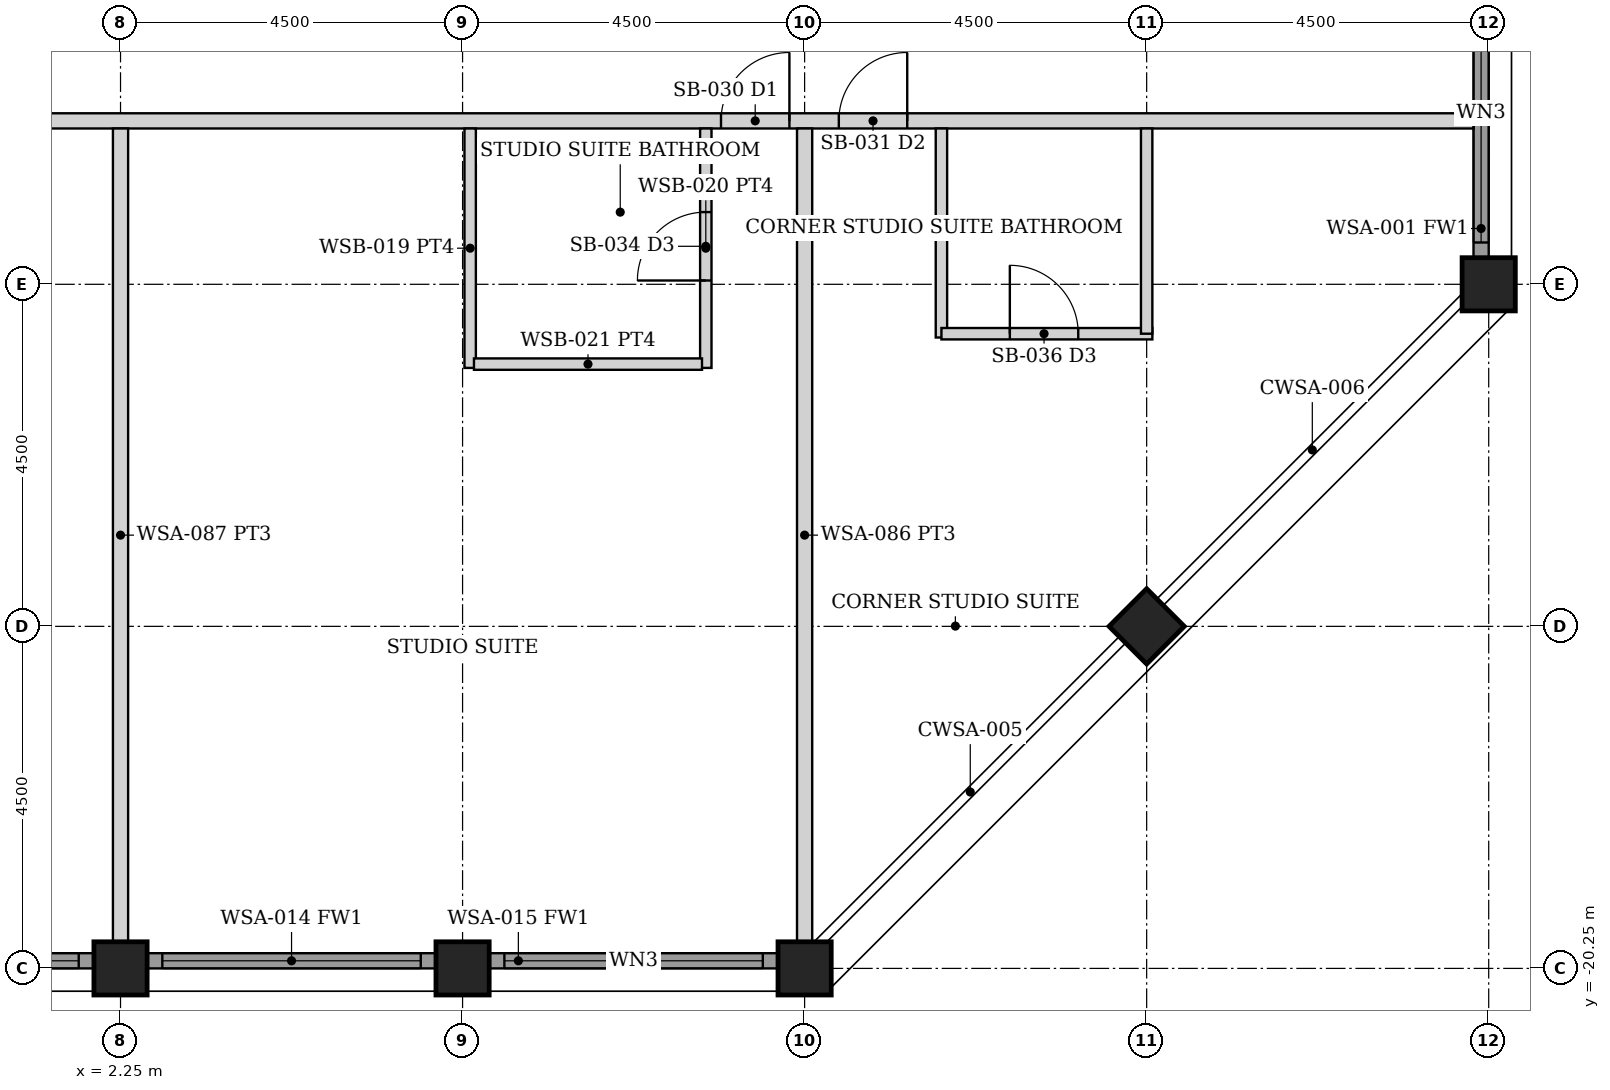
"""IFC4 building model, lengths in metres.
Left out: names, types, materials, properties, quantities, classifications, styles, units other than length and angle.
Written with IfcOpenShell. Run it as: python <this file> out.ifc"""

import sys

from ifc_helpers import new_model, si_unit, direction, frame, frame_2d, origin, origin_2d, place, context, subcontext, project, spatial, rectangle, hollow_rectangle, extrude, element, fill, save


model = new_model("IFC4")
c1 = context("Model", 3, precision=1e-05, world=origin(), true_north=direction((0.0, 1.0)))
c2 = subcontext(c1, "Body", "Model", "MODEL_VIEW")
j1 = project(units=[si_unit("LENGTHUNIT", "METRE"), si_unit("PLANEANGLEUNIT", "RADIAN")], contexts=[c1])
p1 = place(None, origin())
s1 = spatial("IfcSite", under=j1, at=p1, CompositionType="ELEMENT")
p2 = place(p1, origin())
s2 = spatial("IfcBuilding", under=s1, at=p2, CompositionType="ELEMENT")
p3 = place(p2, frame((0.0, 0.0, 212.05)))
s3 = spatial("IfcBuildingStorey", under=s2, at=p3, CompositionType="ELEMENT", Elevation=212.05)
for number, where, z_axis, x_axis in (
    (1, (20.25, -11.25, 0.0), (0.0, 0.0, 1.0), (1.0, 0.0, 0.0)),
    (2, (2.25, -20.25, 0.0), (0.0, 0.0, 1.0), (0.0, 1.0, 0.0)),
    (3, (6.75, -20.25, 0.0), (0.0, 0.0, 1.0), (0.0, 1.0, 0.0)),
    (4, (11.25, -20.25, 0.0), (0.0, 0.0, 1.0), (0.0, 1.0, 0.0)),
    (5, (15.75, -15.75, 0.0), (0.0, 0.0, 1.0), (0.707, -0.707, 0.0)),
):
    element("IfcColumn", number, at=place(p3, frame(where, z_axis=z_axis, x_axis=x_axis)), inside=s3, PredefinedType="COLUMN", context=c2, shape_type="SweptSolid", body=[
        extrude(hollow_rectangle(XDim=0.7, YDim=0.7, WallThickness=0.045, at=origin_2d()), origin(), (0.0, 0.0, 1.0), 3.75),
    ])
p4 = place(p3, frame((-1.895, -20.15, 0.0), z_axis=(0.0, 0.0, 1.0), x_axis=(1.0, 0.0, 0.0)))
e6 = element("IfcWall", 6, at=p4, inside=s3, PredefinedType="SOLIDWALL", context=c2, shape_type="SweptSolid", body=[
    extrude(rectangle(XDim=3.79, YDim=0.2, at=frame_2d((1.895, 0.0))), origin(), (0.0, 0.0, 1.0), 2.629),
])
p5 = place(p4, frame((0.195, 0.0, 0.3)))
e7 = element("IfcOpeningElement", 7, at=p5, cuts=e6, PredefinedType="OPENING", context=c2, shape_type="SweptSolid", body=[
    extrude(rectangle(XDim=3.4, YDim=2.179, at=frame_2d((1.7, 1.089))), frame((0.0, 0.11, 0.0), z_axis=(0.0, -1.0, 0.0), x_axis=(1.0, 0.0, 0.0)), (0.0, 0.0, 1.0), 0.22),
])
p6 = place(p3, frame((2.605, -20.15, 0.0), z_axis=(0.0, 0.0, 1.0), x_axis=(1.0, 0.0, 0.0)))
e8 = element("IfcWall", 8, at=p6, inside=s3, PredefinedType="SOLIDWALL", context=c2, shape_type="SweptSolid", body=[
    extrude(rectangle(XDim=3.79, YDim=0.2, at=frame_2d((1.895, 0.0))), origin(), (0.0, 0.0, 1.0), 2.629),
])
p7 = place(p6, frame((0.195, 0.0, 0.3)))
e9 = element("IfcOpeningElement", 9, at=p7, cuts=e8, PredefinedType="OPENING", context=c2, shape_type="SweptSolid", body=[
    extrude(rectangle(XDim=3.4, YDim=2.179, at=frame_2d((1.7, 1.089))), frame((0.0, 0.11, 0.0), z_axis=(0.0, -1.0, 0.0), x_axis=(1.0, 0.0, 0.0)), (0.0, 0.0, 1.0), 0.22),
])
p8 = place(p3, frame((7.105, -20.15, 0.0), z_axis=(0.0, 0.0, 1.0), x_axis=(1.0, 0.0, 0.0)))
e10 = element("IfcWall", 10, at=p8, inside=s3, PredefinedType="SOLIDWALL", context=c2, shape_type="SweptSolid", body=[
    extrude(rectangle(XDim=3.79, YDim=0.2, at=frame_2d((1.895, 0.0))), origin(), (0.0, 0.0, 1.0), 2.629),
])
p9 = place(p8, frame((0.195, 0.0, 0.3)))
e11 = element("IfcOpeningElement", 11, at=p9, cuts=e10, PredefinedType="OPENING", context=c2, shape_type="SweptSolid", body=[
    extrude(rectangle(XDim=3.4, YDim=2.179, at=frame_2d((1.7, 1.089))), frame((0.0, 0.11, 0.0), z_axis=(0.0, -1.0, 0.0), x_axis=(1.0, 0.0, 0.0)), (0.0, 0.0, 1.0), 0.22),
])
p10 = place(p3, frame((20.15, -10.895, 0.0), z_axis=(0.0, 0.0, 1.0), x_axis=(0.0, 1.0, 0.0)))
e12 = element("IfcWall", 12, at=p10, inside=s3, PredefinedType="SOLIDWALL", context=c2, shape_type="SweptSolid", body=[
    extrude(rectangle(XDim=3.79, YDim=0.2, at=frame_2d((1.895, 0.0))), origin(), (0.0, 0.0, 1.0), 2.629),
])
p11 = place(p10, frame((0.195, 0.0, 0.3)))
e13 = element("IfcOpeningElement", 13, at=p11, cuts=e12, PredefinedType="OPENING", context=c2, shape_type="SweptSolid", body=[
    extrude(rectangle(XDim=3.4, YDim=2.179, at=frame_2d((1.7, 1.089))), frame((0.0, 0.11, 0.0), z_axis=(0.0, -1.0, 0.0), x_axis=(1.0, 0.0, 0.0)), (0.0, 0.0, 1.0), 0.22),
])
p12 = place(p3, frame((-20.05, -9.1, 0.0), z_axis=(0.0, 0.0, 1.0), x_axis=(1.0, 0.0, 0.0)))
e14 = element("IfcWall", 14, at=p12, inside=s3, PredefinedType="PARTITIONING", context=c2, shape_type="SweptSolid", body=[
    extrude(rectangle(XDim=40.1, YDim=0.2, at=frame_2d((20.05, 0.0))), origin(), (0.0, 0.0, 1.0), 2.629),
])
p13 = place(p12, frame((9.0, 0.0, 0.0)))
e15 = element("IfcOpeningElement", 15, at=p13, cuts=e14, PredefinedType="OPENING", context=c2, shape_type="SweptSolid", body=[
    extrude(rectangle(XDim=0.9, YDim=2.1, at=frame_2d((0.45, 1.05))), frame((0.0, 0.11, 0.0), z_axis=(0.0, -1.0, 0.0), x_axis=(1.0, 0.0, 0.0)), (0.0, 0.0, 1.0), 0.22),
])
p14 = place(p12, frame((13.5, 0.0, 0.0)))
e16 = element("IfcOpeningElement", 16, at=p14, cuts=e14, PredefinedType="OPENING", context=c2, shape_type="SweptSolid", body=[
    extrude(rectangle(XDim=0.9, YDim=2.1, at=frame_2d((0.45, 1.05))), frame((0.0, 0.11, 0.0), z_axis=(0.0, -1.0, 0.0), x_axis=(1.0, 0.0, 0.0)), (0.0, 0.0, 1.0), 0.22),
])
p15 = place(p12, frame((30.2, 0.0, 0.0)))
e17 = element("IfcOpeningElement", 17, at=p15, cuts=e14, PredefinedType="OPENING", context=c2, shape_type="SweptSolid", body=[
    extrude(rectangle(XDim=0.9, YDim=2.1, at=frame_2d((0.45, 1.05))), frame((0.0, 0.11, 0.0), z_axis=(0.0, -1.0, 0.0), x_axis=(1.0, 0.0, 0.0)), (0.0, 0.0, 1.0), 0.22),
])
p16 = place(p12, frame((31.75, 0.0, 0.0)))
e18 = element("IfcOpeningElement", 18, at=p16, cuts=e14, PredefinedType="OPENING", context=c2, shape_type="SweptSolid", body=[
    extrude(rectangle(XDim=0.9, YDim=2.1, at=frame_2d((0.45, 1.05))), frame((0.0, 0.11, 0.0), z_axis=(0.0, -1.0, 0.0), x_axis=(1.0, 0.0, 0.0)), (0.0, 0.0, 1.0), 0.22),
])
p17 = place(p12, frame((7.45, 0.0, 0.0)))
e19 = element("IfcOpeningElement", 19, at=p17, cuts=e14, PredefinedType="OPENING", context=c2, shape_type="SweptSolid", body=[
    extrude(rectangle(XDim=0.9, YDim=2.1, at=frame_2d((0.45, 1.05))), frame((0.0, 0.11, 0.0), z_axis=(0.0, -1.0, 0.0), x_axis=(1.0, 0.0, 0.0)), (0.0, 0.0, 1.0), 0.22),
])
p18 = place(p3, frame((9.95, -12.35, 0.0), z_axis=(0.0, 0.0, 1.0), x_axis=(0.0, 1.0, 0.0)))
e20 = element("IfcWall", 20, at=p18, inside=s3, PredefinedType="PARTITIONING", context=c2, shape_type="SweptSolid", body=[
    extrude(rectangle(XDim=3.15, YDim=0.15, at=frame_2d((1.575, 0.0))), origin(), (0.0, 0.0, 1.0), 2.629),
])
p19 = place(p18, frame((1.15, 0.0, 0.0)))
e21 = element("IfcOpeningElement", 21, at=p19, cuts=e20, PredefinedType="OPENING", context=c2, shape_type="SweptSolid", body=[
    extrude(rectangle(XDim=0.9, YDim=2.1, at=frame_2d((0.45, 1.05))), frame((0.0, 0.085, 0.0), z_axis=(0.0, -1.0, 0.0), x_axis=(1.0, 0.0, 0.0)), (0.0, 0.0, 1.0), 0.17),
])
p20 = place(p3, frame((6.85, -12.35, 0.0), z_axis=(0.0, 0.0, 1.0), x_axis=(0.0, 1.0, 0.0)))
e22 = element("IfcWall", 22, at=p20, inside=s3, PredefinedType="PARTITIONING", context=c2, shape_type="SweptSolid", body=[
    extrude(rectangle(XDim=3.15, YDim=0.15, at=frame_2d((1.575, 0.0))), origin(), (0.0, 0.0, 1.0), 2.629),
])
p21 = place(p3, frame((6.9, -12.3, 0.0), z_axis=(0.0, 0.0, 1.0), x_axis=(1.0, 0.0, 0.0)))
e23 = element("IfcWall", 23, at=p21, inside=s3, PredefinedType="PARTITIONING", context=c2, shape_type="SweptSolid", body=[
    extrude(rectangle(XDim=3.0, YDim=0.15, at=frame_2d((1.5, 0.0))), origin(), (0.0, 0.0, 1.0), 2.629),
])
for number, where, z_axis, x_axis in (
    (24, (2.25, -19.9, 0.0), (0.0, 0.0, 1.0), (0.0, 1.0, 0.0)),
    (25, (11.25, -19.9, 0.0), (0.0, 0.0, 1.0), (0.0, 1.0, 0.0)),
):
    element("IfcWall", number, at=place(p3, frame(where, z_axis=z_axis, x_axis=x_axis)), inside=s3, PredefinedType="PARTITIONING", context=c2, shape_type="SweptSolid", body=[
        extrude(rectangle(XDim=10.7, YDim=0.2, at=frame_2d((5.35, 0.0))), origin(), (0.0, 0.0, 1.0), 2.629),
    ])
p22 = place(p3, frame((13.05, -11.95, 0.0), z_axis=(0.0, 0.0, 1.0), x_axis=(0.0, 1.0, 0.0)))
e26 = element("IfcWall", 26, at=p22, inside=s3, PredefinedType="PARTITIONING", context=c2, shape_type="SweptSolid", body=[
    extrude(rectangle(XDim=2.75, YDim=0.15, at=frame_2d((1.375, 0.0))), origin(), (0.0, 0.0, 1.0), 2.629),
])
p23 = place(p3, frame((13.05, -11.9, 0.0), z_axis=(0.0, 0.0, 1.0), x_axis=(1.0, 0.0, 0.0)))
e27 = element("IfcWall", 27, at=p23, inside=s3, PredefinedType="PARTITIONING", context=c2, shape_type="SweptSolid", body=[
    extrude(rectangle(XDim=2.775, YDim=0.15, at=frame_2d((1.387, 0.0))), origin(), (0.0, 0.0, 1.0), 2.629),
])
p24 = place(p23, frame((0.9, 0.0, 0.0)))
e28 = element("IfcOpeningElement", 28, at=p24, cuts=e27, PredefinedType="OPENING", context=c2, shape_type="SweptSolid", body=[
    extrude(rectangle(XDim=0.9, YDim=2.1, at=frame_2d((0.45, 1.05))), frame((0.0, 0.085, 0.0), z_axis=(0.0, -1.0, 0.0), x_axis=(1.0, 0.0, 0.0)), (0.0, 0.0, 1.0), 0.17),
])
p25 = place(p3, frame((15.75, -11.9, 0.0), z_axis=(0.0, 0.0, 1.0), x_axis=(0.0, 1.0, 0.0)))
e29 = element("IfcWall", 29, at=p25, inside=s3, PredefinedType="PARTITIONING", context=c2, shape_type="SweptSolid", body=[
    extrude(rectangle(XDim=2.7, YDim=0.15, at=frame_2d((1.35, 0.0))), origin(), (0.0, 0.0, 1.0), 2.629),
])
p26 = place(p5, origin())
e30 = element("IfcWindow", 30, at=p26, inside=s3, PartitioningType="SINGLE_PANEL", PredefinedType="WINDOW", context=c2, shape_type="SweptSolid", body=[
    extrude(rectangle(XDim=3.4, YDim=2.179, at=frame_2d((1.7, 1.089))), frame((0.0, 0.03, 0.0), z_axis=(0.0, -1.0, 0.0), x_axis=(1.0, 0.0, 0.0)), (0.0, 0.0, 1.0), 0.06),
])
fill(e7, e30)
p27 = place(p7, origin())
e31 = element("IfcWindow", 31, at=p27, inside=s3, PartitioningType="SINGLE_PANEL", PredefinedType="WINDOW", context=c2, shape_type="SweptSolid", body=[
    extrude(rectangle(XDim=3.4, YDim=2.179, at=frame_2d((1.7, 1.089))), frame((0.0, 0.03, 0.0), z_axis=(0.0, -1.0, 0.0), x_axis=(1.0, 0.0, 0.0)), (0.0, 0.0, 1.0), 0.06),
])
fill(e9, e31)
p28 = place(p9, origin())
e32 = element("IfcWindow", 32, at=p28, inside=s3, PartitioningType="SINGLE_PANEL", PredefinedType="WINDOW", context=c2, shape_type="SweptSolid", body=[
    extrude(rectangle(XDim=3.4, YDim=2.179, at=frame_2d((1.7, 1.089))), frame((0.0, 0.03, 0.0), z_axis=(0.0, -1.0, 0.0), x_axis=(1.0, 0.0, 0.0)), (0.0, 0.0, 1.0), 0.06),
])
fill(e11, e32)
p29 = place(p11, origin())
e33 = element("IfcWindow", 33, at=p29, inside=s3, PartitioningType="SINGLE_PANEL", PredefinedType="WINDOW", context=c2, shape_type="SweptSolid", body=[
    extrude(rectangle(XDim=3.4, YDim=2.179, at=frame_2d((1.7, 1.089))), frame((0.0, 0.03, 0.0), z_axis=(0.0, -1.0, 0.0), x_axis=(1.0, 0.0, 0.0)), (0.0, 0.0, 1.0), 0.06),
])
fill(e13, e33)
p30 = place(p15, origin())
e34 = element("IfcDoor", 34, at=p30, inside=s3, OperationType="SINGLE_SWING_RIGHT", PredefinedType="DOOR", context=c2, shape_type="SweptSolid", body=[
    extrude(rectangle(XDim=0.9, YDim=2.1, at=frame_2d((0.45, 1.05))), frame((0.0, 0.025, 0.0), z_axis=(0.0, -1.0, 0.0), x_axis=(1.0, 0.0, 0.0)), (0.0, 0.0, 1.0), 0.05),
])
fill(e17, e34)
p31 = place(p19, origin())
e35 = element("IfcDoor", 35, at=p31, inside=s3, OperationType="SINGLE_SWING_LEFT", PredefinedType="DOOR", context=c2, shape_type="SweptSolid", body=[
    extrude(rectangle(XDim=0.9, YDim=2.1, at=frame_2d((0.45, 1.05))), frame((0.0, 0.025, 0.0), z_axis=(0.0, -1.0, 0.0), x_axis=(1.0, 0.0, 0.0)), (0.0, 0.0, 1.0), 0.05),
])
fill(e21, e35)
p32 = place(p16, origin())
e36 = element("IfcDoor", 36, at=p32, inside=s3, OperationType="SINGLE_SWING_RIGHT", PredefinedType="DOOR", context=c2, shape_type="SweptSolid", body=[
    extrude(rectangle(XDim=0.9, YDim=2.1, at=frame_2d((0.45, 1.05))), frame((0.0, 0.025, 0.0), z_axis=(0.0, -1.0, 0.0), x_axis=(1.0, 0.0, 0.0)), (0.0, 0.0, 1.0), 0.05),
])
fill(e18, e36)
p33 = place(p24, origin())
e37 = element("IfcDoor", 37, at=p33, inside=s3, OperationType="SINGLE_SWING_LEFT", PredefinedType="DOOR", context=c2, shape_type="SweptSolid", body=[
    extrude(rectangle(XDim=0.9, YDim=2.1, at=frame_2d((0.45, 1.05))), frame((0.0, 0.025, 0.0), z_axis=(0.0, -1.0, 0.0), x_axis=(1.0, 0.0, 0.0)), (0.0, 0.0, 1.0), 0.05),
])
fill(e28, e37)
save(model, sys.argv[1])
